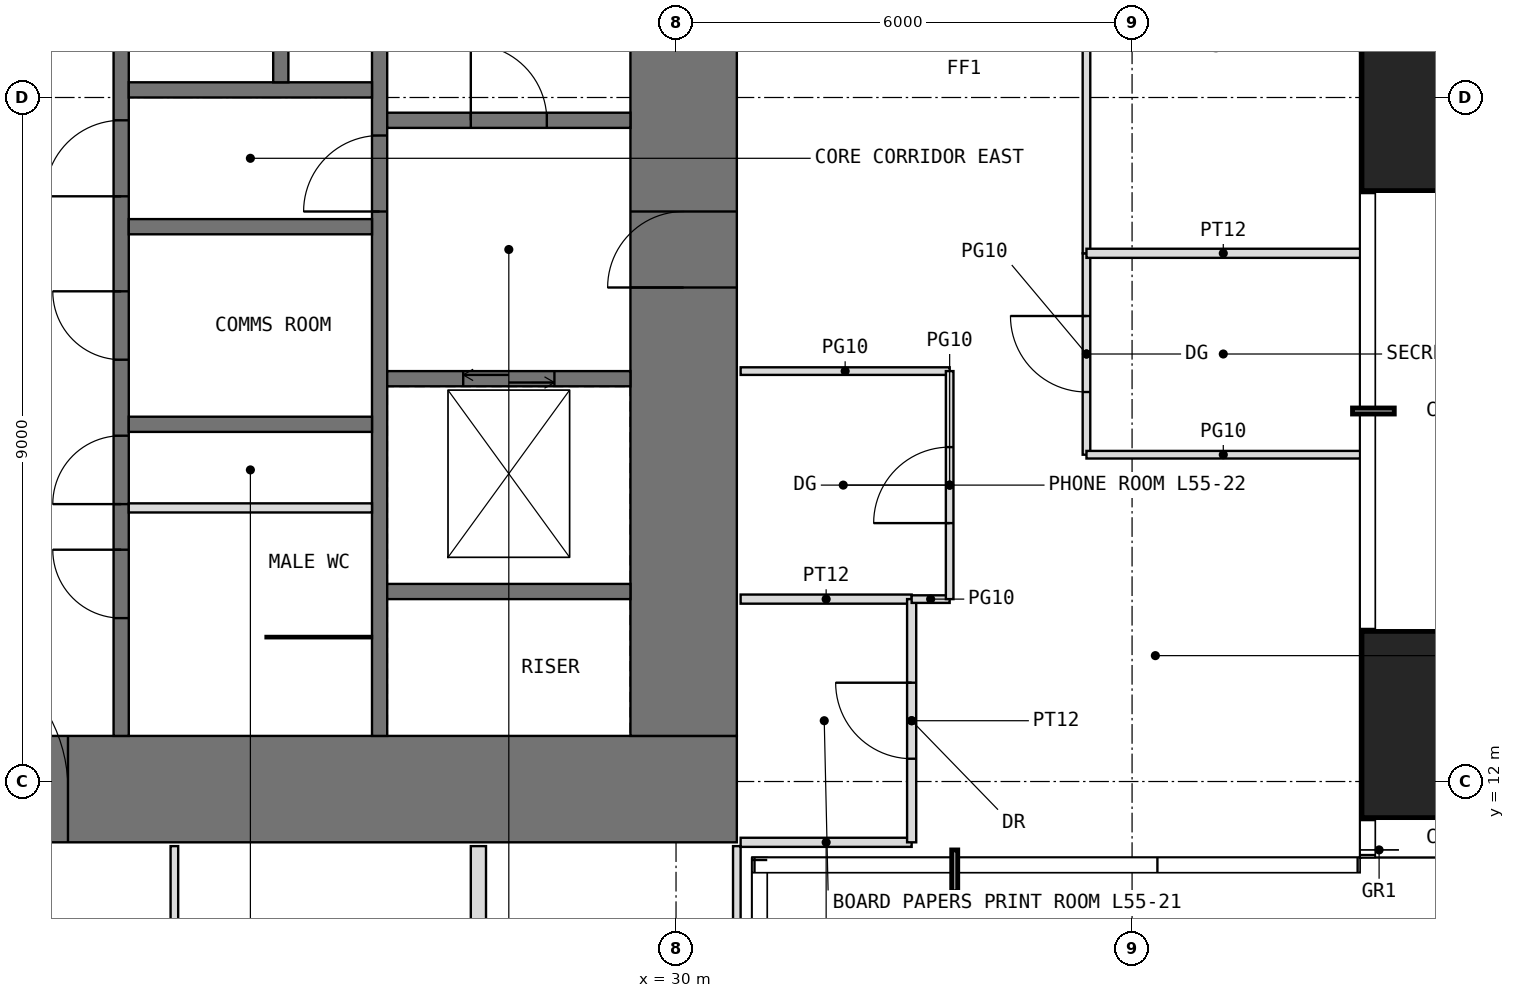
"""IFC4 building model, lengths in metres.
Left out: names, types, materials, properties, quantities, classifications, styles, units other than length and angle.
Written with IfcOpenShell. Run it as: python <this file> out.ifc"""

import sys

from ifc_helpers import new_model, si_unit, direction, frame, frame_2d, origin, origin_2d, place, context, subcontext, project, spatial, rectangle, extrude, element, fill, save


model = new_model("IFC4")
c1 = context("Model", 3, precision=1e-05, world=origin(), true_north=direction((0.0, 1.0)))
c2 = subcontext(c1, "Body", "Model", "MODEL_VIEW")
j1 = project(units=[si_unit("LENGTHUNIT", "METRE"), si_unit("PLANEANGLEUNIT", "RADIAN")], contexts=[c1])
p1 = place(None, origin())
s1 = spatial("IfcSite", under=j1, at=p1, CompositionType="ELEMENT")
p2 = place(p1, origin())
s2 = spatial("IfcBuilding", under=s1, at=p2, CompositionType="ELEMENT")
p3 = place(p2, frame((0.0, 0.0, 230.5)))
s3 = spatial("IfcBuildingStorey", under=s2, at=p3, CompositionType="ELEMENT", Elevation=230.5)
for number, where, z_axis, x_axis in (
    (1, (40.25, 12.75, 0.0), (0.0, 0.0, 1.0), (1.0, 0.0, 0.0)),
    (2, (40.25, 21.0, 0.0), (0.0, 0.0, 1.0), (1.0, 0.0, 0.0)),
):
    element("IfcColumn", number, at=place(p3, frame(where, z_axis=z_axis, x_axis=x_axis)), inside=s3, PredefinedType="COLUMN", context=c2, shape_type="SweptSolid", body=[
        extrude(rectangle(XDim=2.45, YDim=2.45, at=origin_2d()), origin(), (0.0, 0.0, 1.0), 4.0),
    ])
p4 = place(p3, frame((11.2, 11.9, -0.05), z_axis=(0.0, 0.0, 1.0), x_axis=(1.0, 0.0, 0.0)))
e3 = element("IfcWall", 3, at=p4, inside=s3, PredefinedType="SHEAR", context=c2, shape_type="SweptSolid", body=[
    extrude(rectangle(XDim=19.6, YDim=1.4, at=frame_2d((9.8, 0.0))), origin(), (0.0, 0.0, 1.0), 3.8),
])
p5 = place(p4, frame((8.8, 0.0, 0.05)))
e4 = element("IfcOpeningElement", 4, at=p5, cuts=e3, PredefinedType="OPENING", context=c2, shape_type="SweptSolid", body=[
    extrude(rectangle(XDim=2.0, YDim=2.2, at=frame_2d((1.0, 1.1))), frame((0.0, 0.71, 0.0), z_axis=(0.0, -1.0, 0.0), x_axis=(1.0, 0.0, 0.0)), (0.0, 0.0, 1.0), 1.42),
])
p6 = place(p3, frame((30.1, 12.6, -0.05), z_axis=(0.0, 0.0, 1.0), x_axis=(0.0, 1.0, 0.0)))
e5 = element("IfcWall", 5, at=p6, inside=s3, PredefinedType="SHEAR", context=c2, shape_type="SweptSolid", body=[
    extrude(rectangle(XDim=16.8, YDim=1.4, at=frame_2d((8.4, 0.0))), origin(), (0.0, 0.0, 1.0), 3.8),
])
p7 = place(p6, frame((5.9, 0.0, 0.05)))
e6 = element("IfcOpeningElement", 6, at=p7, cuts=e5, PredefinedType="OPENING", context=c2, shape_type="SweptSolid", body=[
    extrude(rectangle(XDim=1.0, YDim=2.2, at=frame_2d((0.5, 1.1))), frame((0.0, 0.71, 0.0), z_axis=(0.0, -1.0, 0.0), x_axis=(1.0, 0.0, 0.0)), (0.0, 0.0, 1.0), 1.42),
])
p8 = place(p3, frame((22.7, 12.6, -0.05), z_axis=(0.0, 0.0, 1.0), x_axis=(0.0, 1.0, 0.0)))
e7 = element("IfcWall", 7, at=p8, inside=s3, PredefinedType="SHEAR", context=c2, shape_type="SweptSolid", body=[
    extrude(rectangle(XDim=16.8, YDim=0.2, at=frame_2d((8.4, 0.0))), origin(), (0.0, 0.0, 1.0), 3.8),
])
p9 = place(p8, frame((3.05, 0.0, 0.05)))
e8 = element("IfcOpeningElement", 8, at=p9, cuts=e7, PredefinedType="OPENING", context=c2, shape_type="SweptSolid", body=[
    extrude(rectangle(XDim=0.9, YDim=2.2, at=frame_2d((0.45, 1.1))), frame((0.0, 0.11, 0.0), z_axis=(0.0, -1.0, 0.0), x_axis=(1.0, 0.0, 0.0)), (0.0, 0.0, 1.0), 0.22),
])
p10 = place(p8, frame((7.1, 0.0, 0.05)))
e9 = element("IfcOpeningElement", 9, at=p10, cuts=e7, PredefinedType="OPENING", context=c2, shape_type="SweptSolid", body=[
    extrude(rectangle(XDim=1.0, YDim=2.2, at=frame_2d((0.5, 1.1))), frame((0.0, 0.11, 0.0), z_axis=(0.0, -1.0, 0.0), x_axis=(1.0, 0.0, 0.0)), (0.0, 0.0, 1.0), 0.22),
])
p11 = place(p8, frame((1.55, 0.0, 0.05)))
e10 = element("IfcOpeningElement", 10, at=p11, cuts=e7, PredefinedType="OPENING", context=c2, shape_type="SweptSolid", body=[
    extrude(rectangle(XDim=0.9, YDim=2.2, at=frame_2d((0.45, 1.1))), frame((0.0, 0.11, 0.0), z_axis=(0.0, -1.0, 0.0), x_axis=(1.0, 0.0, 0.0)), (0.0, 0.0, 1.0), 0.22),
])
p12 = place(p8, frame((4.95, 0.0, 0.05)))
e11 = element("IfcOpeningElement", 11, at=p12, cuts=e7, PredefinedType="OPENING", context=c2, shape_type="SweptSolid", body=[
    extrude(rectangle(XDim=0.9, YDim=2.2, at=frame_2d((0.45, 1.1))), frame((0.0, 0.11, 0.0), z_axis=(0.0, -1.0, 0.0), x_axis=(1.0, 0.0, 0.0)), (0.0, 0.0, 1.0), 0.22),
])
p13 = place(p8, frame((9.4, 0.0, 0.05)))
e12 = element("IfcOpeningElement", 12, at=p13, cuts=e7, PredefinedType="OPENING", context=c2, shape_type="SweptSolid", body=[
    extrude(rectangle(XDim=1.0, YDim=2.2, at=frame_2d((0.5, 1.1))), frame((0.0, 0.11, 0.0), z_axis=(0.0, -1.0, 0.0), x_axis=(1.0, 0.0, 0.0)), (0.0, 0.0, 1.0), 0.22),
])
p14 = place(p8, frame((12.2, 0.0, 0.05)))
e13 = element("IfcOpeningElement", 13, at=p14, cuts=e7, PredefinedType="OPENING", context=c2, shape_type="SweptSolid", body=[
    extrude(rectangle(XDim=1.0, YDim=2.2, at=frame_2d((0.5, 1.1))), frame((0.0, 0.11, 0.0), z_axis=(0.0, -1.0, 0.0), x_axis=(1.0, 0.0, 0.0)), (0.0, 0.0, 1.0), 0.22),
])
p15 = place(p3, frame((26.1, 12.6, -0.05), z_axis=(0.0, 0.0, 1.0), x_axis=(0.0, 1.0, 0.0)))
e14 = element("IfcWall", 14, at=p15, inside=s3, PredefinedType="SHEAR", context=c2, shape_type="SweptSolid", body=[
    extrude(rectangle(XDim=16.8, YDim=0.2, at=frame_2d((8.4, 0.0))), origin(), (0.0, 0.0, 1.0), 3.8),
])
p16 = place(p15, frame((6.9, 0.0, 0.05)))
e15 = element("IfcOpeningElement", 15, at=p16, cuts=e14, PredefinedType="OPENING", context=c2, shape_type="SweptSolid", body=[
    extrude(rectangle(XDim=1.0, YDim=2.2, at=frame_2d((0.5, 1.1))), frame((0.0, 0.11, 0.0), z_axis=(0.0, -1.0, 0.0), x_axis=(1.0, 0.0, 0.0)), (0.0, 0.0, 1.0), 0.22),
])
for number, where, z_axis, x_axis in (
    (16, (22.8, 16.7, -0.05), (0.0, 0.0, 1.0), (1.0, 0.0, 0.0)),
    (17, (22.8, 19.3, -0.05), (0.0, 0.0, 1.0), (1.0, 0.0, 0.0)),
    (18, (22.8, 21.1, -0.05), (0.0, 0.0, 1.0), (1.0, 0.0, 0.0)),
    (19, (26.2, 14.5, -0.05), (0.0, 0.0, 1.0), (1.0, 0.0, 0.0)),
):
    element("IfcWall", number, at=place(p3, frame(where, z_axis=z_axis, x_axis=x_axis)), inside=s3, PredefinedType="SHEAR", context=c2, shape_type="SweptSolid", body=[
        extrude(rectangle(XDim=3.2, YDim=0.2, at=frame_2d((1.6, 0.0))), origin(), (0.0, 0.0, 1.0), 3.8),
    ])
p17 = place(p3, frame((26.2, 17.3, -0.05), z_axis=(0.0, 0.0, 1.0), x_axis=(1.0, 0.0, 0.0)))
e20 = element("IfcWall", 20, at=p17, inside=s3, PredefinedType="SHEAR", context=c2, shape_type="SweptSolid", body=[
    extrude(rectangle(XDim=3.2, YDim=0.2, at=frame_2d((1.6, 0.0))), origin(), (0.0, 0.0, 1.0), 3.8),
])
p18 = place(p17, frame((1.0, 0.0, 0.05)))
e21 = element("IfcOpeningElement", 21, at=p18, cuts=e20, PredefinedType="OPENING", context=c2, shape_type="SweptSolid", body=[
    extrude(rectangle(XDim=1.2, YDim=2.2, at=frame_2d((0.6, 1.1))), frame((0.0, 0.11, 0.0), z_axis=(0.0, -1.0, 0.0), x_axis=(1.0, 0.0, 0.0)), (0.0, 0.0, 1.0), 0.22),
])
p19 = place(p3, frame((26.2, 20.7, -0.05), z_axis=(0.0, 0.0, 1.0), x_axis=(1.0, 0.0, 0.0)))
e22 = element("IfcWall", 22, at=p19, inside=s3, PredefinedType="SHEAR", context=c2, shape_type="SweptSolid", body=[
    extrude(rectangle(XDim=3.2, YDim=0.2, at=frame_2d((1.6, 0.0))), origin(), (0.0, 0.0, 1.0), 3.8),
])
p20 = place(p19, frame((1.1, 0.0, 0.05)))
e23 = element("IfcOpeningElement", 23, at=p20, cuts=e22, PredefinedType="OPENING", context=c2, shape_type="SweptSolid", body=[
    extrude(rectangle(XDim=1.0, YDim=2.2, at=frame_2d((0.5, 1.1))), frame((0.0, 0.11, 0.0), z_axis=(0.0, -1.0, 0.0), x_axis=(1.0, 0.0, 0.0)), (0.0, 0.0, 1.0), 0.22),
])
p21 = place(p3, frame((22.8, 15.6, 0.0), z_axis=(0.0, 0.0, 1.0), x_axis=(1.0, 0.0, 0.0)))
e24 = element("IfcWall", 24, at=p21, inside=s3, PredefinedType="PARTITIONING", context=c2, shape_type="SweptSolid", body=[
    extrude(rectangle(XDim=3.2, YDim=0.12, at=frame_2d((1.6, 0.0))), origin(), (0.0, 0.0, 1.0), 3.55),
])
p22 = place(p3, frame((24.6, 13.9, 0.0), z_axis=(0.0, 0.0, 1.0), x_axis=(1.0, 0.0, 0.0)))
e25 = element("IfcWall", 25, at=p22, inside=s3, PredefinedType="PARTITIONING", context=c2, shape_type="SweptSolid", body=[
    extrude(rectangle(XDim=1.4, YDim=0.03, at=frame_2d((0.7, 0.0))), origin(), (0.0, 0.0, 1.0), 3.55),
])
p23 = place(p3, frame((24.8, 21.2, -0.05), z_axis=(0.0, 0.0, 1.0), x_axis=(0.0, 1.0, 0.0)))
e26 = element("IfcWall", 26, at=p23, inside=s3, PredefinedType="SHEAR", context=c2, shape_type="SweptSolid", body=[
    extrude(rectangle(XDim=2.6, YDim=0.2, at=frame_2d((1.3, 0.0))), origin(), (0.0, 0.0, 1.0), 3.8),
])
p24 = place(p23, frame((0.85, 0.0, 0.05)))
e27 = element("IfcOpeningElement", 27, at=p24, cuts=e26, PredefinedType="OPENING", context=c2, shape_type="SweptSolid", body=[
    extrude(rectangle(XDim=0.9, YDim=2.2, at=frame_2d((0.45, 1.1))), frame((0.0, 0.11, 0.0), z_axis=(0.0, -1.0, 0.0), x_axis=(1.0, 0.0, 0.0)), (0.0, 0.0, 1.0), 0.22),
])
p25 = place(p3, frame((23.4, 6.6, 0.0), z_axis=(0.0, 0.0, 1.0), x_axis=(0.0, 1.0, 0.0)))
e28 = element("IfcWall", 28, at=p25, inside=s3, PredefinedType="PARTITIONING", context=c2, shape_type="SweptSolid", body=[
    extrude(rectangle(XDim=4.55, YDim=0.1, at=frame_2d((2.275, 0.0))), origin(), (0.0, 0.0, 1.0), 3.55),
])
p26 = place(p3, frame((27.4, 6.6, 0.0), z_axis=(0.0, 0.0, 1.0), x_axis=(0.0, 1.0, 0.0)))
e29 = element("IfcWall", 29, at=p26, inside=s3, PredefinedType="PARTITIONING", context=c2, shape_type="SweptSolid", body=[
    extrude(rectangle(XDim=4.55, YDim=0.2, at=frame_2d((2.275, 0.0))), origin(), (0.0, 0.0, 1.0), 3.55),
])
p27 = place(p3, frame((30.8, 6.6, 0.0), z_axis=(0.0, 0.0, 1.0), x_axis=(0.0, 1.0, 0.0)))
e30 = element("IfcWall", 30, at=p27, inside=s3, PredefinedType="PARTITIONING", context=c2, shape_type="SweptSolid", body=[
    extrude(rectangle(XDim=4.55, YDim=0.1, at=frame_2d((2.275, 0.0))), origin(), (0.0, 0.0, 1.0), 3.55),
])
for number, where, z_axis, x_axis in (
    (31, (30.85, 11.2, 0.0), (0.0, 0.0, 1.0), (1.0, 0.0, 0.0)),
    (32, (30.85, 14.4, 0.0), (0.0, 0.0, 1.0), (1.0, 0.0, 0.0)),
):
    element("IfcWall", number, at=place(p3, frame(where, z_axis=z_axis, x_axis=x_axis)), inside=s3, PredefinedType="PARTITIONING", context=c2, shape_type="SweptSolid", body=[
        extrude(rectangle(XDim=2.25, YDim=0.12, at=frame_2d((1.125, 0.0))), origin(), (0.0, 0.0, 1.0), 3.55),
    ])
p28 = place(p3, frame((30.85, 17.4, 0.0), z_axis=(0.0, 0.0, 1.0), x_axis=(1.0, 0.0, 0.0)))
e33 = element("IfcWall", 33, at=p28, inside=s3, PredefinedType="PARTITIONING", context=c2, shape_type="SweptSolid", body=[
    extrude(rectangle(XDim=2.75, YDim=0.1, at=frame_2d((1.375, 0.0))), origin(), (0.0, 0.0, 1.0), 3.55),
])
p29 = place(p3, frame((33.1, 11.2, 0.0), z_axis=(0.0, 0.0, 1.0), x_axis=(0.0, 1.0, 0.0)))
e34 = element("IfcWall", 34, at=p29, inside=s3, PredefinedType="PARTITIONING", context=c2, shape_type="SweptSolid", body=[
    extrude(rectangle(XDim=3.2, YDim=0.12, at=frame_2d((1.6, 0.0))), origin(), (0.0, 0.0, 1.0), 3.55),
])
p30 = place(p29, frame((1.1, 0.0, 0.0)))
e35 = element("IfcOpeningElement", 35, at=p30, cuts=e34, PredefinedType="OPENING", context=c2, shape_type="SweptSolid", body=[
    extrude(rectangle(XDim=1.0, YDim=2.2, at=frame_2d((0.5, 1.1))), frame((0.0, 0.07, 0.0), z_axis=(0.0, -1.0, 0.0), x_axis=(1.0, 0.0, 0.0)), (0.0, 0.0, 1.0), 0.14),
])
p31 = place(p3, frame((33.1, 14.4, 0.0), z_axis=(0.0, 0.0, 1.0), x_axis=(1.0, 0.0, 0.0)))
e36 = element("IfcWall", 36, at=p31, inside=s3, PredefinedType="PARTITIONING", context=c2, shape_type="SweptSolid", body=[
    extrude(rectangle(XDim=0.5, YDim=0.1, at=frame_2d((0.25, 0.0))), origin(), (0.0, 0.0, 1.0), 3.55),
])
p32 = place(p3, frame((33.6, 14.4, 0.0), z_axis=(0.0, 0.0, 1.0), x_axis=(0.0, 1.0, 0.0)))
e37 = element("IfcWall", 37, at=p32, inside=s3, PredefinedType="PARTITIONING", context=c2, shape_type="SweptSolid", body=[
    extrude(rectangle(XDim=3.0, YDim=0.1, at=frame_2d((1.5, 0.0))), origin(), (0.0, 0.0, 1.0), 3.55),
])
p33 = place(p32, frame((1.0, 0.0, 0.0)))
e38 = element("IfcOpeningElement", 38, at=p33, cuts=e37, PredefinedType="OPENING", context=c2, shape_type="SweptSolid", body=[
    extrude(rectangle(XDim=1.0, YDim=2.4, at=frame_2d((0.5, 1.2))), frame((0.0, 0.06, 0.0), z_axis=(0.0, -1.0, 0.0), x_axis=(1.0, 0.0, 0.0)), (0.0, 0.0, 1.0), 0.12),
])
p34 = place(p3, frame((35.4, 16.3, 0.0), z_axis=(0.0, 0.0, 1.0), x_axis=(0.0, 1.0, 0.0)))
e39 = element("IfcWall", 39, at=p34, inside=s3, PredefinedType="PARTITIONING", context=c2, shape_type="SweptSolid", body=[
    extrude(rectangle(XDim=2.65, YDim=0.1, at=frame_2d((1.325, 0.0))), origin(), (0.0, 0.0, 1.0), 3.55),
])
p35 = place(p34, frame((0.825, 0.0, 0.0)))
e40 = element("IfcOpeningElement", 40, at=p35, cuts=e39, PredefinedType="OPENING", context=c2, shape_type="SweptSolid", body=[
    extrude(rectangle(XDim=1.0, YDim=2.4, at=frame_2d((0.5, 1.2))), frame((0.0, 0.06, 0.0), z_axis=(0.0, -1.0, 0.0), x_axis=(1.0, 0.0, 0.0)), (0.0, 0.0, 1.0), 0.12),
])
p36 = place(p3, frame((35.4, 16.3, 0.0), z_axis=(0.0, 0.0, 1.0), x_axis=(1.0, 0.0, 0.0)))
e41 = element("IfcWall", 41, at=p36, inside=s3, PredefinedType="PARTITIONING", context=c2, shape_type="SweptSolid", body=[
    extrude(rectangle(XDim=3.6, YDim=0.1, at=frame_2d((1.8, 0.0))), origin(), (0.0, 0.0, 1.0), 3.55),
])
p37 = place(p3, frame((35.4, 18.95, 0.0), z_axis=(0.0, 0.0, 1.0), x_axis=(0.0, 1.0, 0.0)))
e42 = element("IfcWall", 42, at=p37, inside=s3, PredefinedType="PARTITIONING", context=c2, shape_type="SweptSolid", body=[
    extrude(rectangle(XDim=9.25, YDim=0.1, at=frame_2d((4.625, 0.0))), origin(), (0.0, 0.0, 1.0), 3.55),
])
p38 = place(p37, frame((3.225, 0.0, 0.0)))
e43 = element("IfcOpeningElement", 43, at=p38, cuts=e42, PredefinedType="OPENING", context=c2, shape_type="SweptSolid", body=[
    extrude(rectangle(XDim=1.0, YDim=2.4, at=frame_2d((0.5, 1.2))), frame((0.0, 0.06, 0.0), z_axis=(0.0, -1.0, 0.0), x_axis=(1.0, 0.0, 0.0)), (0.0, 0.0, 1.0), 0.12),
])
p39 = place(p3, frame((35.4, 18.95, 0.0), z_axis=(0.0, 0.0, 1.0), x_axis=(1.0, 0.0, 0.0)))
e44 = element("IfcWall", 44, at=p39, inside=s3, PredefinedType="PARTITIONING", context=c2, shape_type="SweptSolid", body=[
    extrude(rectangle(XDim=3.6, YDim=0.12, at=frame_2d((1.8, 0.0))), origin(), (0.0, 0.0, 1.0), 3.55),
])
p40 = place(p5, origin())
e45 = element("IfcDoor", 45, at=p40, inside=s3, OperationType="DOUBLE_DOOR_SINGLE_SWING", PredefinedType="DOOR", context=c2, shape_type="SweptSolid", body=[
    extrude(rectangle(XDim=2.0, YDim=2.2, at=frame_2d((1.0, 1.1))), frame((0.0, 0.025, 0.0), z_axis=(0.0, -1.0, 0.0), x_axis=(1.0, 0.0, 0.0)), (0.0, 0.0, 1.0), 0.05),
])
fill(e4, e45)
p41 = place(p9, origin())
e46 = element("IfcDoor", 46, at=p41, inside=s3, OperationType="SINGLE_SWING_LEFT", PredefinedType="DOOR", context=c2, shape_type="SweptSolid", body=[
    extrude(rectangle(XDim=0.9, YDim=2.2, at=frame_2d((0.45, 1.1))), frame((0.0, 0.025, 0.0), z_axis=(0.0, -1.0, 0.0), x_axis=(1.0, 0.0, 0.0)), (0.0, 0.0, 1.0), 0.05),
])
fill(e8, e46)
p42 = place(p7, origin())
e47 = element("IfcDoor", 47, at=p42, inside=s3, OperationType="SINGLE_SWING_LEFT", PredefinedType="DOOR", context=c2, shape_type="SweptSolid", body=[
    extrude(rectangle(XDim=1.0, YDim=2.2, at=frame_2d((0.5, 1.1))), frame((0.0, 0.025, 0.0), z_axis=(0.0, -1.0, 0.0), x_axis=(1.0, 0.0, 0.0)), (0.0, 0.0, 1.0), 0.05),
])
fill(e6, e47)
p43 = place(p20, origin())
e48 = element("IfcDoor", 48, at=p43, inside=s3, OperationType="SINGLE_SWING_LEFT", PredefinedType="DOOR", context=c2, shape_type="SweptSolid", body=[
    extrude(rectangle(XDim=1.0, YDim=2.2, at=frame_2d((0.5, 1.1))), frame((0.0, 0.025, 0.0), z_axis=(0.0, -1.0, 0.0), x_axis=(1.0, 0.0, 0.0)), (0.0, 0.0, 1.0), 0.05),
])
fill(e23, e48)
p44 = place(p16, origin())
e49 = element("IfcDoor", 49, at=p44, inside=s3, OperationType="SINGLE_SWING_LEFT", PredefinedType="DOOR", context=c2, shape_type="SweptSolid", body=[
    extrude(rectangle(XDim=1.0, YDim=2.2, at=frame_2d((0.5, 1.1))), frame((0.0, 0.025, 0.0), z_axis=(0.0, -1.0, 0.0), x_axis=(1.0, 0.0, 0.0)), (0.0, 0.0, 1.0), 0.05),
])
fill(e15, e49)
p45 = place(p10, origin())
e50 = element("IfcDoor", 50, at=p45, inside=s3, OperationType="SINGLE_SWING_LEFT", PredefinedType="DOOR", context=c2, shape_type="SweptSolid", body=[
    extrude(rectangle(XDim=1.0, YDim=2.2, at=frame_2d((0.5, 1.1))), frame((0.0, 0.025, 0.0), z_axis=(0.0, -1.0, 0.0), x_axis=(1.0, 0.0, 0.0)), (0.0, 0.0, 1.0), 0.05),
])
fill(e9, e50)
p46 = place(p11, origin())
e51 = element("IfcDoor", 51, at=p46, inside=s3, OperationType="SINGLE_SWING_RIGHT", PredefinedType="DOOR", context=c2, shape_type="SweptSolid", body=[
    extrude(rectangle(XDim=0.9, YDim=2.2, at=frame_2d((0.45, 1.1))), frame((0.0, 0.025, 0.0), z_axis=(0.0, -1.0, 0.0), x_axis=(1.0, 0.0, 0.0)), (0.0, 0.0, 1.0), 0.05),
])
fill(e10, e51)
p47 = place(p12, origin())
e52 = element("IfcDoor", 52, at=p47, inside=s3, OperationType="SINGLE_SWING_RIGHT", PredefinedType="DOOR", context=c2, shape_type="SweptSolid", body=[
    extrude(rectangle(XDim=0.9, YDim=2.2, at=frame_2d((0.45, 1.1))), frame((0.0, 0.025, 0.0), z_axis=(0.0, -1.0, 0.0), x_axis=(1.0, 0.0, 0.0)), (0.0, 0.0, 1.0), 0.05),
])
fill(e11, e52)
p48 = place(p30, origin())
e53 = element("IfcDoor", 53, at=p48, inside=s3, OperationType="SINGLE_SWING_RIGHT", PredefinedType="DOOR", context=c2, shape_type="SweptSolid", body=[
    extrude(rectangle(XDim=1.0, YDim=2.2, at=frame_2d((0.5, 1.1))), frame((0.0, 0.025, 0.0), z_axis=(0.0, -1.0, 0.0), x_axis=(1.0, 0.0, 0.0)), (0.0, 0.0, 1.0), 0.05),
])
fill(e35, e53)
p49 = place(p33, origin())
e54 = element("IfcDoor", 54, at=p49, inside=s3, OperationType="SINGLE_SWING_LEFT", PredefinedType="DOOR", context=c2, shape_type="SweptSolid", body=[
    extrude(rectangle(XDim=1.0, YDim=2.4, at=frame_2d((0.5, 1.2))), frame((0.0, 0.025, 0.0), z_axis=(0.0, -1.0, 0.0), x_axis=(1.0, 0.0, 0.0)), (0.0, 0.0, 1.0), 0.05),
])
fill(e38, e54)
p50 = place(p35, origin())
e55 = element("IfcDoor", 55, at=p50, inside=s3, OperationType="SINGLE_SWING_RIGHT", PredefinedType="DOOR", context=c2, shape_type="SweptSolid", body=[
    extrude(rectangle(XDim=1.0, YDim=2.4, at=frame_2d((0.5, 1.2))), frame((0.0, 0.025, 0.0), z_axis=(0.0, -1.0, 0.0), x_axis=(1.0, 0.0, 0.0)), (0.0, 0.0, 1.0), 0.05),
])
fill(e40, e55)
p51 = place(p18, origin())
e56 = element("IfcDoor", 56, at=p51, inside=s3, OperationType="DOUBLE_DOOR_SLIDING", PredefinedType="DOOR", context=c2, shape_type="SweptSolid", body=[
    extrude(rectangle(XDim=1.2, YDim=2.2, at=frame_2d((0.6, 1.1))), frame((0.0, 0.025, 0.0), z_axis=(0.0, -1.0, 0.0), x_axis=(1.0, 0.0, 0.0)), (0.0, 0.0, 1.0), 0.05),
])
fill(e21, e56)
save(model, sys.argv[1])
